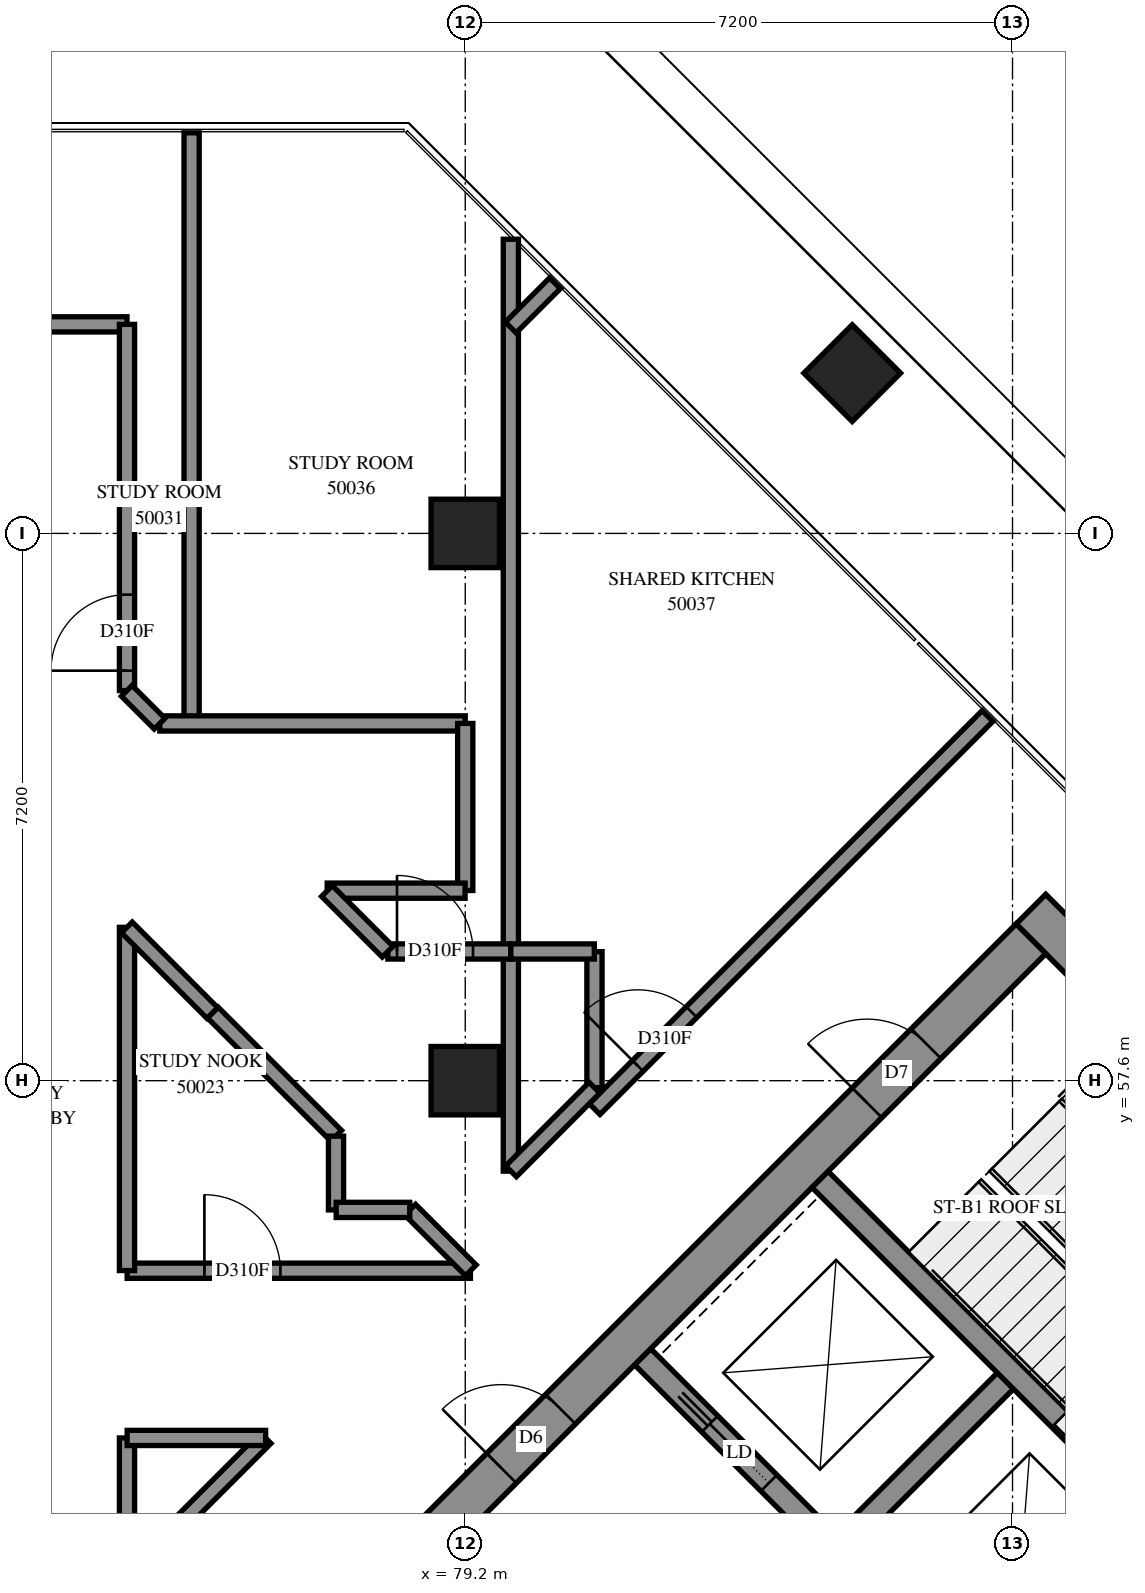
"""IFC4 building model, lengths in metres.
Left out: names, types, materials, properties, quantities, classifications, styles, units other than length and angle.
Written with IfcOpenShell. Run it as: python <this file> out.ifc"""

import sys

from ifc_helpers import new_model, si_unit, direction, frame, frame_2d, origin, origin_2d, place, context, subcontext, project, spatial, rectangle, extrude, element, fill, save


model = new_model("IFC4")
c1 = context("Model", 3, precision=1e-05, world=origin(), true_north=direction((0.0, 1.0)))
c2 = subcontext(c1, "Body", "Model", "MODEL_VIEW")
j1 = project(units=[si_unit("LENGTHUNIT", "METRE"), si_unit("PLANEANGLEUNIT", "RADIAN")], contexts=[c1])
p1 = place(None, origin())
s1 = spatial("IfcSite", under=j1, at=p1, CompositionType="ELEMENT")
p2 = place(p1, origin())
s2 = spatial("IfcBuilding", under=s1, at=p2, CompositionType="ELEMENT")
p3 = place(p2, frame((0.0, 0.0, 185.4)))
s3 = spatial("IfcBuildingStorey", under=s2, at=p3, CompositionType="ELEMENT", Elevation=185.4)
for number, where, z_axis, x_axis in (
    (1, (79.2, 57.6, 0.0), (0.0, 0.0, 1.0), (1.0, 0.0, 0.0)),
    (2, (79.2, 64.8, 0.0), (0.0, 0.0, 1.0), (1.0, 0.0, 0.0)),
    (3, (84.291, 66.909, 0.0), (0.0, 0.0, 1.0), (0.707, -0.707, 0.0)),
):
    element("IfcColumn", number, at=place(p3, frame(where, z_axis=z_axis, x_axis=x_axis)), inside=s3, PredefinedType="COLUMN", context=c2, shape_type="SweptSolid", body=[
        extrude(rectangle(XDim=0.9, YDim=0.9, at=origin_2d()), origin(), (0.0, 0.0, 1.0), 3.9),
    ])
p4 = place(p3, frame((86.642, 59.855, -0.3), z_axis=(0.0, 0.0, 1.0), x_axis=(0.707110007, -0.7071035554, 0.0)))
e4 = element("IfcWall", 4, at=p4, inside=s3, PredefinedType="SHEAR", context=c2, shape_type="SweptSolid", body=[
    extrude(rectangle(XDim=15.5, YDim=0.55, at=frame_2d((7.75, 0.0))), origin(), (0.0, 0.0, 1.0), 3.5),
])
p5 = place(p4, frame((10.55, 0.0, 0.3)))
e5 = element("IfcOpeningElement", 5, at=p5, cuts=e4, PredefinedType="OPENING", context=c2, shape_type="SweptSolid", body=[
    extrude(rectangle(XDim=0.8, YDim=2.1, at=frame_2d((0.4, 1.05))), frame((0.0, 0.285, 0.0), z_axis=(0.0, -1.0, 0.0), x_axis=(1.0, 0.0, 0.0)), (0.0, 0.0, 1.0), 0.57),
])
p6 = place(p3, frame((76.46, 49.284, -0.3), z_axis=(0.0, 0.0, 1.0), x_axis=(0.7071067812, 0.7071067812, 0.0)))
e6 = element("IfcWall", 6, at=p6, inside=s3, PredefinedType="SHEAR", context=c2, shape_type="SweptSolid", body=[
    extrude(rectangle(XDim=14.4, YDim=0.55, at=frame_2d((7.2, 0.0))), origin(), (0.0, 0.0, 1.0), 3.5),
])
p7 = place(p6, frame((4.55, 0.0, 0.3)))
e7 = element("IfcOpeningElement", 7, at=p7, cuts=e6, PredefinedType="OPENING", context=c2, shape_type="SweptSolid", body=[
    extrude(rectangle(XDim=1.1, YDim=2.1, at=frame_2d((0.55, 1.05))), frame((0.0, 0.285, 0.0), z_axis=(0.0, -1.0, 0.0), x_axis=(1.0, 0.0, 0.0)), (0.0, 0.0, 1.0), 0.57),
])
p8 = place(p6, frame((11.35, 0.0, 0.3)))
e8 = element("IfcOpeningElement", 8, at=p8, cuts=e6, PredefinedType="OPENING", context=c2, shape_type="SweptSolid", body=[
    extrude(rectangle(XDim=1.1, YDim=2.1, at=frame_2d((0.55, 1.05))), frame((0.0, 0.285, 0.0), z_axis=(0.0, -1.0, 0.0), x_axis=(1.0, 0.0, 0.0)), (0.0, 0.0, 1.0), 0.57),
])
p9 = place(p3, frame((84.079, 51.423, 0.0), z_axis=(0.0, 0.0, 1.0), x_axis=(0.7071219326, 0.7070916295, 0.0)))
e9 = element("IfcWall", 9, at=p9, inside=s3, PredefinedType="SOLIDWALL", context=c2, shape_type="SweptSolid", body=[
    extrude(rectangle(XDim=3.3, YDim=0.3, at=frame_2d((1.65, 0.0))), origin(), (0.0, 0.0, 1.0), 3.9),
])
p10 = place(p3, frame((81.534, 53.969, 0.0), z_axis=(0.0, 0.0, 1.0), x_axis=(0.707103309, -0.7071102534, 0.0)))
e10 = element("IfcWall", 10, at=p10, inside=s3, PredefinedType="SOLIDWALL", context=c2, shape_type="SweptSolid", body=[
    extrude(rectangle(XDim=14.4, YDim=0.3, at=frame_2d((7.2, 0.0))), origin(), (0.0, 0.0, 1.0), 3.9),
])
p11 = place(p10, frame((1.25, 0.0, 0.0)))
e11 = element("IfcOpeningElement", 11, at=p11, cuts=e10, PredefinedType="OPENING", context=c2, shape_type="SweptSolid", body=[
    extrude(rectangle(XDim=1.1, YDim=2.1, at=frame_2d((0.55, 1.05))), frame((0.0, 0.16, 0.0), z_axis=(0.0, -1.0, 0.0), x_axis=(1.0, 0.0, 0.0)), (0.0, 0.0, 1.0), 0.32),
])
p12 = place(p10, frame((4.85, 0.0, 0.0)))
e12 = element("IfcOpeningElement", 12, at=p12, cuts=e10, PredefinedType="OPENING", context=c2, shape_type="SweptSolid", body=[
    extrude(rectangle(XDim=1.1, YDim=2.1, at=frame_2d((0.55, 1.05))), frame((0.0, 0.16, 0.0), z_axis=(0.0, -1.0, 0.0), x_axis=(1.0, 0.0, 0.0)), (0.0, 0.0, 1.0), 0.32),
])
p13 = place(p10, frame((8.45, 0.0, 0.0)))
e13 = element("IfcOpeningElement", 13, at=p13, cuts=e10, PredefinedType="OPENING", context=c2, shape_type="SweptSolid", body=[
    extrude(rectangle(XDim=1.1, YDim=2.1, at=frame_2d((0.55, 1.05))), frame((0.0, 0.16, 0.0), z_axis=(0.0, -1.0, 0.0), x_axis=(1.0, 0.0, 0.0)), (0.0, 0.0, 1.0), 0.32),
])
p14 = place(p10, frame((12.05, 0.0, 0.0)))
e14 = element("IfcOpeningElement", 14, at=p14, cuts=e10, PredefinedType="OPENING", context=c2, shape_type="SweptSolid", body=[
    extrude(rectangle(XDim=1.1, YDim=2.1, at=frame_2d((0.55, 1.05))), frame((0.0, 0.16, 0.0), z_axis=(0.0, -1.0, 0.0), x_axis=(1.0, 0.0, 0.0)), (0.0, 0.0, 1.0), 0.32),
])
p15 = place(p3, frame((83.867, 56.302, 0.0), z_axis=(0.0, 0.0, 1.0), x_axis=(0.7071137256, -0.7070998367, 0.0)))
e15 = element("IfcWall", 15, at=p15, inside=s3, PredefinedType="SOLIDWALL", context=c2, shape_type="SweptSolid", body=[
    extrude(rectangle(XDim=7.2, YDim=0.3, at=frame_2d((3.6, 0.0))), origin(), (0.0, 0.0, 1.0), 3.9),
])
p16 = place(p3, frame((54.85, 67.55, 0.0), z_axis=(0.0, 0.0, 1.0), x_axis=(1.0, 0.0, 0.0)))
e16 = element("IfcWall", 16, at=p16, inside=s3, PredefinedType="PARTITIONING", context=c2, shape_type="SweptSolid", body=[
    extrude(rectangle(XDim=19.9, YDim=0.2, at=frame_2d((9.95, 0.0))), origin(), (0.0, 0.0, 1.0), 3.9),
])
p17 = place(p16, frame((4.843, 0.0, 0.0)))
e17 = element("IfcOpeningElement", 17, at=p17, cuts=e16, PredefinedType="OPENING", context=c2, shape_type="SweptSolid", body=[
    extrude(rectangle(XDim=1.0, YDim=2.1, at=frame_2d((0.5, 1.05))), frame((0.0, 0.11, 0.0), z_axis=(0.0, -1.0, 0.0), x_axis=(1.0, 0.0, 0.0)), (0.0, 0.0, 1.0), 0.22),
])
p18 = place(p16, frame((6.918, 0.0, 0.0)))
e18 = element("IfcOpeningElement", 18, at=p18, cuts=e16, PredefinedType="OPENING", context=c2, shape_type="SweptSolid", body=[
    extrude(rectangle(XDim=1.0, YDim=2.1, at=frame_2d((0.5, 1.05))), frame((0.0, 0.11, 0.0), z_axis=(0.0, -1.0, 0.0), x_axis=(1.0, 0.0, 0.0)), (0.0, 0.0, 1.0), 0.22),
])
p19 = place(p16, frame((12.043, 0.0, 0.0)))
e19 = element("IfcOpeningElement", 19, at=p19, cuts=e16, PredefinedType="OPENING", context=c2, shape_type="SweptSolid", body=[
    extrude(rectangle(XDim=1.0, YDim=2.1, at=frame_2d((0.5, 1.05))), frame((0.0, 0.11, 0.0), z_axis=(0.0, -1.0, 0.0), x_axis=(1.0, 0.0, 0.0)), (0.0, 0.0, 1.0), 0.22),
])
p20 = place(p16, frame((14.117, 0.0, 0.0)))
e20 = element("IfcOpeningElement", 20, at=p20, cuts=e16, PredefinedType="OPENING", context=c2, shape_type="SweptSolid", body=[
    extrude(rectangle(XDim=1.0, YDim=2.1, at=frame_2d((0.5, 1.05))), frame((0.0, 0.11, 0.0), z_axis=(0.0, -1.0, 0.0), x_axis=(1.0, 0.0, 0.0)), (0.0, 0.0, 1.0), 0.22),
])
p21 = place(p3, frame((79.8, 59.3, 0.0), z_axis=(0.0, 0.0, 1.0), x_axis=(0.0, 1.0, 0.0)))
e21 = element("IfcWall", 21, at=p21, inside=s3, PredefinedType="PARTITIONING", context=c2, shape_type="SweptSolid", body=[
    extrude(rectangle(XDim=9.37, YDim=0.2, at=frame_2d((4.685, 0.0))), origin(), (0.0, 0.0, 1.0), 3.9),
])
p22 = place(p3, frame((75.6, 62.3, 0.0), z_axis=(0.0, 0.0, 1.0), x_axis=(0.0, 1.0, 0.0)))
e22 = element("IfcWall", 22, at=p22, inside=s3, PredefinedType="PARTITIONING", context=c2, shape_type="SweptSolid", body=[
    extrude(rectangle(XDim=7.77, YDim=0.2, at=frame_2d((3.885, 0.0))), origin(), (0.0, 0.0, 1.0), 3.9),
])
p23 = place(p3, frame((80.902, 57.226, 0.0), z_axis=(0.0, 0.0, 1.0), x_axis=(0.7069700233, 0.7072435126, 0.0)))
e23 = element("IfcWall", 23, at=p23, inside=s3, PredefinedType="PARTITIONING", context=c2, shape_type="SweptSolid", body=[
    extrude(rectangle(XDim=7.313, YDim=0.2, at=frame_2d((3.656, 0.0))), origin(), (0.0, 0.0, 1.0), 3.9),
])
p24 = place(p23, frame((0.805, 0.0, 0.0)))
e24 = element("IfcOpeningElement", 24, at=p24, cuts=e23, PredefinedType="OPENING", context=c2, shape_type="SweptSolid", body=[
    extrude(rectangle(XDim=1.0, YDim=2.1, at=frame_2d((0.5, 1.05))), frame((0.0, 0.11, 0.0), z_axis=(0.0, -1.0, 0.0), x_axis=(1.0, 0.0, 0.0)), (0.0, 0.0, 1.0), 0.22),
])
p25 = place(p3, frame((74.75, 62.732, 0.0), z_axis=(0.0, 0.0, 1.0), x_axis=(0.0, 1.0, 0.0)))
e25 = element("IfcWall", 25, at=p25, inside=s3, PredefinedType="PARTITIONING", context=c2, shape_type="SweptSolid", body=[
    extrude(rectangle(XDim=4.818, YDim=0.2, at=frame_2d((2.409, 0.0))), origin(), (0.0, 0.0, 1.0), 3.9),
])
p26 = place(p25, frame((0.262, 0.0, 0.0)))
e26 = element("IfcOpeningElement", 26, at=p26, cuts=e25, PredefinedType="OPENING", context=c2, shape_type="SweptSolid", body=[
    extrude(rectangle(XDim=1.0, YDim=2.1, at=frame_2d((0.5, 1.05))), frame((0.0, 0.11, 0.0), z_axis=(0.0, -1.0, 0.0), x_axis=(1.0, 0.0, 0.0)), (0.0, 0.0, 1.0), 0.22),
])
p27 = place(p3, frame((74.752, 55.1, 0.0), z_axis=(0.0, 0.0, 1.0), x_axis=(1.0, 0.0, 0.0)))
e27 = element("IfcWall", 27, at=p27, inside=s3, PredefinedType="PARTITIONING", context=c2, shape_type="SweptSolid", body=[
    extrude(rectangle(XDim=4.516, YDim=0.2, at=frame_2d((2.258, 0.0))), origin(), (0.0, 0.0, 1.0), 3.9),
])
p28 = place(p27, frame((1.016, 0.0, 0.0)))
e28 = element("IfcOpeningElement", 28, at=p28, cuts=e27, PredefinedType="OPENING", context=c2, shape_type="SweptSolid", body=[
    extrude(rectangle(XDim=1.0, YDim=2.1, at=frame_2d((0.5, 1.05))), frame((0.0, 0.11, 0.0), z_axis=(0.0, -1.0, 0.0), x_axis=(1.0, 0.0, 0.0)), (0.0, 0.0, 1.0), 0.22),
])
p29 = place(p3, frame((74.75, 55.102, 0.0), z_axis=(0.0, 0.0, 1.0), x_axis=(0.0, 1.0, 0.0)))
e29 = element("IfcWall", 29, at=p29, inside=s3, PredefinedType="PARTITIONING", context=c2, shape_type="SweptSolid", body=[
    extrude(rectangle(XDim=4.516, YDim=0.2, at=frame_2d((2.258, 0.0))), origin(), (0.0, 0.0, 1.0), 3.9),
])
p30 = place(p3, frame((75.182, 62.3, 0.0), z_axis=(0.0, 0.0, 1.0), x_axis=(1.0, 0.0, 0.0)))
e30 = element("IfcWall", 30, at=p30, inside=s3, PredefinedType="PARTITIONING", context=c2, shape_type="SweptSolid", body=[
    extrude(rectangle(XDim=4.018, YDim=0.2, at=frame_2d((2.009, 0.0))), origin(), (0.0, 0.0, 1.0), 3.9),
])
p31 = place(p3, frame((79.8, 56.41, 0.0), z_axis=(0.0, 0.0, 1.0), x_axis=(0.0, 1.0, 0.0)))
e31 = element("IfcWall", 31, at=p31, inside=s3, PredefinedType="PARTITIONING", context=c2, shape_type="SweptSolid", body=[
    extrude(rectangle(XDim=2.89, YDim=0.2, at=frame_2d((1.445, 0.0))), origin(), (0.0, 0.0, 1.0), 3.9),
])
p32 = place(p3, frame((74.751, 51.077, 0.0), z_axis=(0.0, 0.0, 1.0), x_axis=(0.7071067812, 0.7071067812, 0.0)))
e32 = element("IfcWall", 32, at=p32, inside=s3, PredefinedType="PARTITIONING", context=c2, shape_type="SweptSolid", body=[
    extrude(rectangle(XDim=2.577, YDim=0.2, at=frame_2d((1.288, 0.0))), origin(), (0.0, 0.0, 1.0), 3.9),
])
p33 = place(p3, frame((75.879, 58.497, 0.0), z_axis=(0.0, 0.0, 1.0), x_axis=(0.7075423257, -0.7066709682, 0.0)))
e33 = element("IfcWall", 33, at=p33, inside=s3, PredefinedType="PARTITIONING", context=c2, shape_type="SweptSolid", body=[
    extrude(rectangle(XDim=2.295, YDim=0.2, at=frame_2d((1.148, 0.0))), origin(), (0.0, 0.0, 1.0), 3.9),
])
p34 = place(p3, frame((79.2, 60.102, 0.0), z_axis=(0.0, 0.0, 1.0), x_axis=(0.0, 1.0, 0.0)))
e34 = element("IfcWall", 34, at=p34, inside=s3, PredefinedType="PARTITIONING", context=c2, shape_type="SweptSolid", body=[
    extrude(rectangle(XDim=2.198, YDim=0.2, at=frame_2d((1.099, 0.0))), origin(), (0.0, 0.0, 1.0), 3.9),
])
p35 = place(p3, frame((74.75, 51.076, 0.0), z_axis=(0.0, 0.0, 1.0), x_axis=(0.0, 1.0, 0.0)))
e35 = element("IfcWall", 35, at=p35, inside=s3, PredefinedType="PARTITIONING", context=c2, shape_type="SweptSolid", body=[
    extrude(rectangle(XDim=1.824, YDim=0.2, at=frame_2d((0.912, 0.0))), origin(), (0.0, 0.0, 1.0), 3.9),
])
p36 = place(p3, frame((74.752, 52.9, 0.0), z_axis=(0.0, 0.0, 1.0), x_axis=(1.0, 0.0, 0.0)))
e36 = element("IfcWall", 36, at=p36, inside=s3, PredefinedType="PARTITIONING", context=c2, shape_type="SweptSolid", body=[
    extrude(rectangle(XDim=1.822, YDim=0.2, at=frame_2d((0.911, 0.0))), origin(), (0.0, 0.0, 1.0), 3.9),
])
p37 = place(p3, frame((77.384, 60.1, 0.0), z_axis=(0.0, 0.0, 1.0), x_axis=(1.0, 0.0, 0.0)))
e37 = element("IfcWall", 37, at=p37, inside=s3, PredefinedType="PARTITIONING", context=c2, shape_type="SweptSolid", body=[
    extrude(rectangle(XDim=1.814, YDim=0.2, at=frame_2d((0.907, 0.0))), origin(), (0.0, 0.0, 1.0), 3.9),
])
p38 = place(p3, frame((80.9, 57.508, 0.0), z_axis=(0.0, 0.0, 1.0), x_axis=(0.0, 1.0, 0.0)))
e38 = element("IfcWall", 38, at=p38, inside=s3, PredefinedType="PARTITIONING", context=c2, shape_type="SweptSolid", body=[
    extrude(rectangle(XDim=1.79, YDim=0.2, at=frame_2d((0.895, 0.0))), origin(), (0.0, 0.0, 1.0), 3.9),
])
p39 = place(p3, frame((78.182, 59.3, 0.0), z_axis=(0.0, 0.0, 1.0), x_axis=(1.0, 0.0, 0.0)))
e39 = element("IfcWall", 39, at=p39, inside=s3, PredefinedType="PARTITIONING", context=c2, shape_type="SweptSolid", body=[
    extrude(rectangle(XDim=1.618, YDim=0.2, at=frame_2d((0.809, 0.0))), origin(), (0.0, 0.0, 1.0), 3.9),
])
p40 = place(p39, frame((0.12, 0.0, 0.0)))
e40 = element("IfcOpeningElement", 40, at=p40, cuts=e39, PredefinedType="OPENING", context=c2, shape_type="SweptSolid", body=[
    extrude(rectangle(XDim=1.0, YDim=2.1, at=frame_2d((0.5, 1.05))), frame((0.0, 0.11, 0.0), z_axis=(0.0, -1.0, 0.0), x_axis=(1.0, 0.0, 0.0)), (0.0, 0.0, 1.0), 0.22),
])
p41 = place(p3, frame((74.749, 59.617, 0.0), z_axis=(0.0, 0.0, 1.0), x_axis=(0.7064779627, -0.7077350409, 0.0)))
e41 = element("IfcWall", 41, at=p41, inside=s3, PredefinedType="PARTITIONING", context=c2, shape_type="SweptSolid", body=[
    extrude(rectangle(XDim=1.591, YDim=0.2, at=frame_2d((0.795, 0.0))), origin(), (0.0, 0.0, 1.0), 3.9),
])
p42 = place(p3, frame((79.802, 56.408, 0.0), z_axis=(0.0, 0.0, 1.0), x_axis=(0.7064630795, 0.7077498975, 0.0)))
e42 = element("IfcWall", 42, at=p42, inside=s3, PredefinedType="PARTITIONING", context=c2, shape_type="SweptSolid", body=[
    extrude(rectangle(XDim=1.554, YDim=0.2, at=frame_2d((0.777, 0.0))), origin(), (0.0, 0.0, 1.0), 3.9),
])
for number, where, z_axis, x_axis in (
    (43, (77.381, 60.095, 0.0), (0.0, 0.0, 1.0), (0.707, -0.707, 0.0)),
    (44, (78.475, 55.903, 0.0), (0.0, 0.0, 1.0), (0.707, -0.707, 0.0)),
):
    element("IfcWall", number, at=place(p3, frame(where, z_axis=z_axis, x_axis=x_axis)), inside=s3, PredefinedType="PARTITIONING", context=c2, shape_type="SweptSolid", body=[
        extrude(rectangle(XDim=1.129, YDim=0.2, at=frame_2d((0.564, 0.0))), origin(), (0.0, 0.0, 1.0), 3.9),
    ])
p43 = place(p3, frame((79.8, 59.3, 0.0), z_axis=(0.0, 0.0, 1.0), x_axis=(1.0, 0.0, 0.0)))
e45 = element("IfcWall", 45, at=p43, inside=s3, PredefinedType="PARTITIONING", context=c2, shape_type="SweptSolid", body=[
    extrude(rectangle(XDim=1.098, YDim=0.2, at=frame_2d((0.549, 0.0))), origin(), (0.0, 0.0, 1.0), 3.9),
])
p44 = place(p3, frame((77.5, 55.9, 0.0), z_axis=(0.0, 0.0, 1.0), x_axis=(0.0, 1.0, 0.0)))
e46 = element("IfcWall", 46, at=p44, inside=s3, PredefinedType="PARTITIONING", context=c2, shape_type="SweptSolid", body=[
    extrude(rectangle(XDim=0.97, YDim=0.2, at=frame_2d((0.485, 0.0))), origin(), (0.0, 0.0, 1.0), 3.9),
])
p45 = place(p3, frame((77.502, 55.9, 0.0), z_axis=(0.0, 0.0, 1.0), x_axis=(1.0, 0.0, 0.0)))
e47 = element("IfcWall", 47, at=p45, inside=s3, PredefinedType="PARTITIONING", context=c2, shape_type="SweptSolid", body=[
    extrude(rectangle(XDim=0.968, YDim=0.2, at=frame_2d((0.484, 0.0))), origin(), (0.0, 0.0, 1.0), 3.9),
])
p46 = place(p3, frame((79.799, 67.509, 0.0), z_axis=(0.0, 0.0, 1.0), x_axis=(0.7071067812, 0.7071067812, 0.0)))
e48 = element("IfcWall", 48, at=p46, inside=s3, PredefinedType="PARTITIONING", context=c2, shape_type="SweptSolid", body=[
    extrude(rectangle(XDim=0.823, YDim=0.2, at=frame_2d((0.412, 0.0))), origin(), (0.0, 0.0, 1.0), 3.9),
])
p47 = place(p3, frame((74.747, 62.729, 0.0), z_axis=(0.0, 0.0, 1.0), x_axis=(0.7071067812, -0.7071067812, 0.0)))
e49 = element("IfcWall", 49, at=p47, inside=s3, PredefinedType="PARTITIONING", context=c2, shape_type="SweptSolid", body=[
    extrude(rectangle(XDim=0.611, YDim=0.2, at=frame_2d((0.305, 0.0))), origin(), (0.0, 0.0, 1.0), 3.9),
])
p48 = place(p7, origin())
e50 = element("IfcDoor", 50, at=p48, inside=s3, OperationType="DOUBLE_DOOR_SINGLE_SWING", PredefinedType="DOOR", context=c2, shape_type="SweptSolid", body=[
    extrude(rectangle(XDim=1.1, YDim=2.1, at=frame_2d((0.55, 1.05))), frame((0.0, 0.025, 0.0), z_axis=(0.0, -1.0, 0.0), x_axis=(1.0, 0.0, 0.0)), (0.0, 0.0, 1.0), 0.05),
])
fill(e7, e50)
p49 = place(p8, origin())
e51 = element("IfcDoor", 51, at=p49, inside=s3, OperationType="SINGLE_SWING_LEFT", PredefinedType="DOOR", context=c2, shape_type="SweptSolid", body=[
    extrude(rectangle(XDim=1.1, YDim=2.1, at=frame_2d((0.55, 1.05))), frame((0.0, 0.025, 0.0), z_axis=(0.0, -1.0, 0.0), x_axis=(1.0, 0.0, 0.0)), (0.0, 0.0, 1.0), 0.05),
])
fill(e8, e51)
p50 = place(p11, origin())
e52 = element("IfcDoor", 52, at=p50, inside=s3, OperationType="SLIDING_TO_LEFT", PredefinedType="DOOR", context=c2, shape_type="SweptSolid", body=[
    extrude(rectangle(XDim=1.1, YDim=2.1, at=frame_2d((0.55, 1.05))), frame((0.0, 0.025, 0.0), z_axis=(0.0, -1.0, 0.0), x_axis=(1.0, 0.0, 0.0)), (0.0, 0.0, 1.0), 0.05),
])
fill(e11, e52)
p51 = place(p28, origin())
e53 = element("IfcDoor", 53, at=p51, inside=s3, OperationType="SINGLE_SWING_LEFT", PredefinedType="DOOR", context=c2, shape_type="SweptSolid", body=[
    extrude(rectangle(XDim=1.0, YDim=2.1, at=frame_2d((0.5, 1.05))), frame((0.0, 0.025, 0.0), z_axis=(0.0, -1.0, 0.0), x_axis=(1.0, 0.0, 0.0)), (0.0, 0.0, 1.0), 0.05),
])
fill(e28, e53)
p52 = place(p26, origin())
e54 = element("IfcDoor", 54, at=p52, inside=s3, OperationType="SINGLE_SWING_RIGHT", PredefinedType="DOOR", context=c2, shape_type="SweptSolid", body=[
    extrude(rectangle(XDim=1.0, YDim=2.1, at=frame_2d((0.5, 1.05))), frame((0.0, 0.025, 0.0), z_axis=(0.0, -1.0, 0.0), x_axis=(1.0, 0.0, 0.0)), (0.0, 0.0, 1.0), 0.05),
])
fill(e26, e54)
p53 = place(p40, origin())
e55 = element("IfcDoor", 55, at=p53, inside=s3, OperationType="SINGLE_SWING_LEFT", PredefinedType="DOOR", context=c2, shape_type="SweptSolid", body=[
    extrude(rectangle(XDim=1.0, YDim=2.1, at=frame_2d((0.5, 1.05))), frame((0.0, 0.025, 0.0), z_axis=(0.0, -1.0, 0.0), x_axis=(1.0, 0.0, 0.0)), (0.0, 0.0, 1.0), 0.05),
])
fill(e40, e55)
p54 = place(p24, origin())
e56 = element("IfcDoor", 56, at=p54, inside=s3, OperationType="SINGLE_SWING_RIGHT", PredefinedType="DOOR", context=c2, shape_type="SweptSolid", body=[
    extrude(rectangle(XDim=1.0, YDim=2.1, at=frame_2d((0.5, 1.05))), frame((0.0, 0.025, 0.0), z_axis=(0.0, -1.0, 0.0), x_axis=(1.0, 0.0, 0.0)), (0.0, 0.0, 1.0), 0.05),
])
fill(e24, e56)
save(model, sys.argv[1])
